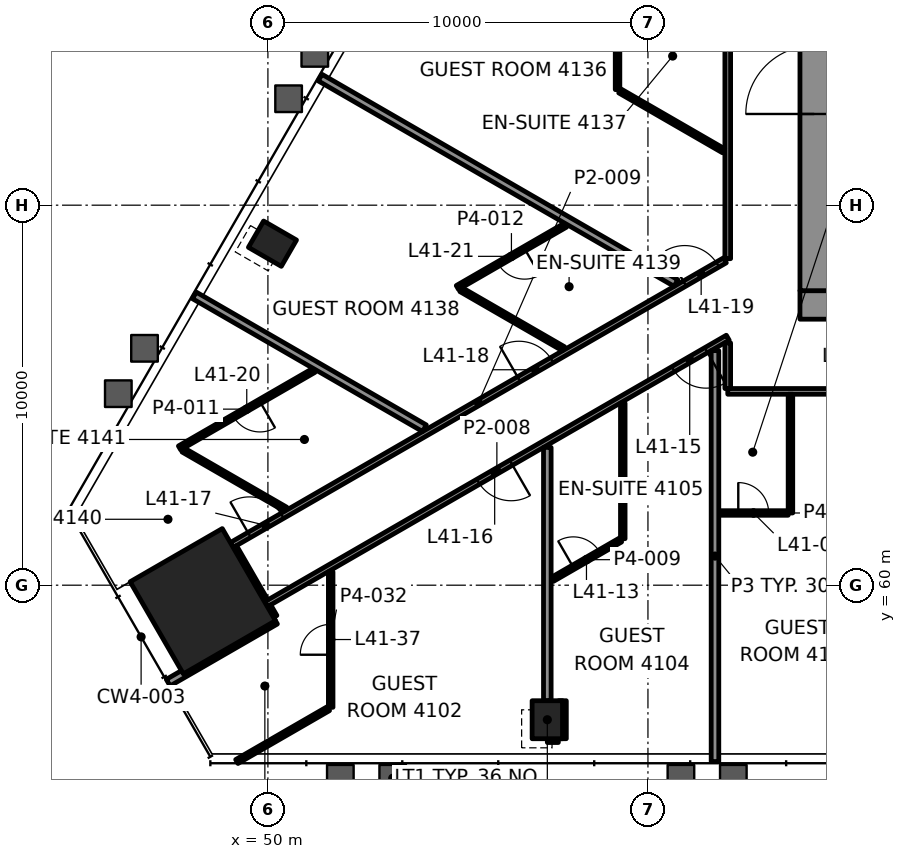
"""IFC4 building model, lengths in metres.
Left out: names, types, materials, properties, quantities, classifications, styles, units other than length and angle.
Written with IfcOpenShell. Run it as: python <this file> out.ifc"""

import sys

from ifc_helpers import new_model, si_unit, direction, frame, frame_2d, origin, origin_2d, place, context, subcontext, project, spatial, rectangle, hollow_rectangle, extrude, element, fill, save


model = new_model("IFC4")
c1 = context("Model", 3, precision=1e-05, world=origin(), true_north=direction((0.0, 1.0)))
c2 = subcontext(c1, "Body", "Model", "MODEL_VIEW")
j1 = project(units=[si_unit("LENGTHUNIT", "METRE"), si_unit("PLANEANGLEUNIT", "RADIAN")], contexts=[c1])
p1 = place(None, origin())
s1 = spatial("IfcSite", under=j1, at=p1, CompositionType="ELEMENT")
p2 = place(p1, origin())
s2 = spatial("IfcBuilding", under=s1, at=p2, CompositionType="ELEMENT")
p3 = place(p2, frame((0.0, 0.0, 179.2)))
s3 = spatial("IfcBuildingStorey", under=s2, at=p3, CompositionType="ELEMENT", Elevation=179.2)
p4 = place(p3, frame((48.287, 59.577, 0.0), z_axis=(0.0, 0.0, 1.0), x_axis=(0.5, -0.866025403784, 0.0)))
e1 = element("IfcColumn", 1, at=p4, inside=s3, PredefinedType="COLUMN", context=c2, shape_type="SweptSolid", body=[
    extrude(rectangle(XDim=2.8, YDim=2.8, at=origin_2d()), origin(), (0.0, 0.0, 1.0), 3.9),
])
for number, where, z_axis, x_axis in (
    (2, (57.352, 56.46, -0.0), (0.0, 0.0, 1.0), (1.0, 0.0, 0.0)),
    (3, (50.12, 68.987, -0.0), (0.0, 0.0, 1.0), (-0.5, -0.866, 0.0)),
):
    element("IfcColumn", number, at=place(p3, frame(where, z_axis=z_axis, x_axis=x_axis)), inside=s3, PredefinedType="COLUMN", context=c2, shape_type="SweptSolid", body=[
        extrude(hollow_rectangle(XDim=0.8, YDim=1.0, WallThickness=0.05, at=origin_2d()), origin(), (0.0, 0.0, 1.0), 3.9),
    ])
p5 = place(p3, frame((64.0, 67.375, 0.0), z_axis=(0.0, 0.0, 1.0), x_axis=(1.0, 0.0, 0.0)))
e4 = element("IfcWall", 4, at=p5, inside=s3, PredefinedType="SHEAR", context=c2, shape_type="SweptSolid", body=[
    extrude(rectangle(XDim=22.0, YDim=0.75, at=frame_2d((11.0, 0.0))), origin(), (0.0, 0.0, 1.0), 3.7),
])
p6 = place(p5, frame((3.15, 0.0, 0.0)))
e5 = element("IfcOpeningElement", 5, at=p6, cuts=e4, PredefinedType="OPENING", context=c2, shape_type="SweptSolid", body=[
    extrude(rectangle(XDim=0.9, YDim=2.1, at=frame_2d((0.45, 1.05))), frame((0.0, 0.385, 0.0), z_axis=(0.0, -1.0, 0.0), x_axis=(1.0, 0.0, 0.0)), (0.0, 0.0, 1.0), 0.77),
])
p7 = place(p3, frame((64.375, 67.75, 0.0), z_axis=(0.0, 0.0, 1.0), x_axis=(0.0, 1.0, 0.0)))
e6 = element("IfcWall", 6, at=p7, inside=s3, PredefinedType="SHEAR", context=c2, shape_type="SweptSolid", body=[
    extrude(rectangle(XDim=14.5, YDim=0.75, at=frame_2d((7.25, 0.0))), origin(), (0.0, 0.0, 1.0), 3.7),
])
p8 = place(p7, frame((4.65, 0.0, 0.0)))
e7 = element("IfcOpeningElement", 7, at=p8, cuts=e6, PredefinedType="OPENING", context=c2, shape_type="SweptSolid", body=[
    extrude(rectangle(XDim=1.8, YDim=2.1, at=frame_2d((0.9, 1.05))), frame((0.0, 0.385, 0.0), z_axis=(0.0, -1.0, 0.0), x_axis=(1.0, 0.0, 0.0)), (0.0, 0.0, 1.0), 0.77),
])
p9 = place(p7, frame((8.5, 0.0, 0.0)))
e8 = element("IfcOpeningElement", 8, at=p9, cuts=e6, PredefinedType="OPENING", context=c2, shape_type="SweptSolid", body=[
    extrude(rectangle(XDim=0.9, YDim=2.1, at=frame_2d((0.45, 1.05))), frame((0.0, 0.385, 0.0), z_axis=(0.0, -1.0, 0.0), x_axis=(1.0, 0.0, 0.0)), (0.0, 0.0, 1.0), 0.77),
])
p10 = place(p7, frame((12.2, 0.0, 0.0)))
e9 = element("IfcOpeningElement", 9, at=p10, cuts=e6, PredefinedType="OPENING", context=c2, shape_type="SweptSolid", body=[
    extrude(rectangle(XDim=0.9, YDim=2.1, at=frame_2d((0.45, 1.05))), frame((0.0, 0.385, 0.0), z_axis=(0.0, -1.0, 0.0), x_axis=(1.0, 0.0, 0.0)), (0.0, 0.0, 1.0), 0.77),
])
p11 = place(p3, frame((57.352, 55.96, 0.0), z_axis=(0.0, 0.0, 1.0), x_axis=(1.0, 0.0, 0.0)))
e10 = element("IfcWall", 10, at=p11, inside=s3, PredefinedType="PARTITIONING", context=c2, shape_type="SweptSolid", body=[
    extrude(rectangle(XDim=0.29, YDim=0.2, at=frame_2d((0.145, 0.0))), origin(), (0.0, 0.0, 1.0), 3.1),
])
p12 = place(p3, frame((61.864, 61.9, 0.0), z_axis=(0.0, 0.0, 1.0), x_axis=(1.0, 0.0, 0.0)))
e11 = element("IfcWall", 11, at=p12, inside=s3, PredefinedType="PARTITIONING", context=c2, shape_type="SweptSolid", body=[
    extrude(rectangle(XDim=1.825, YDim=0.12, at=frame_2d((0.913, 0.0))), origin(), (0.0, 0.0, 1.0), 3.1),
])
p13 = place(p12, frame((0.513, 0.0, 0.0)))
e12 = element("IfcOpeningElement", 12, at=p13, cuts=e11, PredefinedType="OPENING", context=c2, shape_type="SweptSolid", body=[
    extrude(rectangle(XDim=0.8, YDim=2.1, at=frame_2d((0.4, 1.05))), frame((0.0, 0.07, 0.0), z_axis=(0.0, -1.0, 0.0), x_axis=(1.0, 0.0, 0.0)), (0.0, 0.0, 1.0), 0.14),
])
p14 = place(p3, frame((87.9, 65.1, 0.0), z_axis=(0.0, 0.0, 1.0), x_axis=(-1.0, 0.0, 0.0)))
e13 = element("IfcWall", 13, at=p14, inside=s3, PredefinedType="PARTITIONING", context=c2, shape_type="SweptSolid", body=[
    extrude(rectangle(XDim=25.8, YDim=0.15, at=frame_2d((12.9, 0.0))), origin(), (0.0, 0.0, 1.0), 3.1),
])
p15 = place(p14, frame((2.264, 0.0, 0.0)))
e14 = element("IfcOpeningElement", 14, at=p15, cuts=e13, PredefinedType="OPENING", context=c2, shape_type="SweptSolid", body=[
    extrude(rectangle(XDim=1.0, YDim=2.1, at=frame_2d((0.5, 1.05))), frame((0.0, 0.085, 0.0), z_axis=(0.0, -1.0, 0.0), x_axis=(1.0, 0.0, 0.0)), (0.0, 0.0, 1.0), 0.17),
])
p16 = place(p14, frame((10.244, 0.0, 0.0)))
e15 = element("IfcOpeningElement", 15, at=p16, cuts=e13, PredefinedType="OPENING", context=c2, shape_type="SweptSolid", body=[
    extrude(rectangle(XDim=0.9, YDim=2.1, at=frame_2d((0.45, 1.05))), frame((0.0, 0.085, 0.0), z_axis=(0.0, -1.0, 0.0), x_axis=(1.0, 0.0, 0.0)), (0.0, 0.0, 1.0), 0.17),
])
p17 = place(p14, frame((18.135, 0.0, 0.0)))
e16 = element("IfcOpeningElement", 16, at=p17, cuts=e13, PredefinedType="OPENING", context=c2, shape_type="SweptSolid", body=[
    extrude(rectangle(XDim=1.0, YDim=2.1, at=frame_2d((0.5, 1.05))), frame((0.0, 0.085, 0.0), z_axis=(0.0, -1.0, 0.0), x_axis=(1.0, 0.0, 0.0)), (0.0, 0.0, 1.0), 0.17),
])
p18 = place(p14, frame((21.936, 0.0, 0.0)))
e17 = element("IfcOpeningElement", 17, at=p18, cuts=e13, PredefinedType="OPENING", context=c2, shape_type="SweptSolid", body=[
    extrude(rectangle(XDim=1.0, YDim=2.1, at=frame_2d((0.5, 1.05))), frame((0.0, 0.085, 0.0), z_axis=(0.0, -1.0, 0.0), x_axis=(1.0, 0.0, 0.0)), (0.0, 0.0, 1.0), 0.17),
])
p19 = place(p3, frame((49.182, 55.36, 0.0), z_axis=(0.0, 0.0, 1.0), x_axis=(0.86601027972, 0.500026194733, 0.0)))
e18 = element("IfcWall", 18, at=p19, inside=s3, PredefinedType="PARTITIONING", context=c2, shape_type="SweptSolid", body=[
    extrude(rectangle(XDim=2.783, YDim=0.12, at=frame_2d((1.392, 0.0))), origin(), (0.0, 0.0, 1.0), 3.1),
])
p20 = place(p3, frame((57.487, 60.155, 0.0), z_axis=(0.0, 0.0, 1.0), x_axis=(0.866018462269, 0.500012022864, 0.0)))
e19 = element("IfcWall", 19, at=p20, inside=s3, PredefinedType="PARTITIONING", context=c2, shape_type="SweptSolid", body=[
    extrude(rectangle(XDim=2.068, YDim=0.12, at=frame_2d((1.034, 0.0))), origin(), (0.0, 0.0, 1.0), 3.1),
])
p21 = place(p20, frame((0.634, 0.0, 0.0)))
e20 = element("IfcOpeningElement", 20, at=p21, cuts=e19, PredefinedType="OPENING", context=c2, shape_type="SweptSolid", body=[
    extrude(rectangle(XDim=0.8, YDim=2.1, at=frame_2d((0.4, 1.05))), frame((0.0, 0.07, 0.0), z_axis=(0.0, -1.0, 0.0), x_axis=(1.0, 0.0, 0.0)), (0.0, 0.0, 1.0), 0.14),
])
p22 = place(p3, frame((47.376, 57.435, 0.0), z_axis=(0.0, 0.0, 1.0), x_axis=(0.866035906198, 0.499981808845, 0.0)))
e21 = element("IfcWall", 21, at=p22, inside=s3, PredefinedType="PARTITIONING", context=c2, shape_type="SweptSolid", body=[
    extrude(rectangle(XDim=3.259, YDim=0.2, at=frame_2d((1.63, 0.0))), origin(), (0.0, 0.0, 1.0), 3.1),
])
p23 = place(p3, frame((62.1, 66.513, 0.0), z_axis=(0.0, 0.0, 1.0), x_axis=(-0.866025334814, -0.500000119461, 0.0)))
e22 = element("IfcWall", 22, at=p23, inside=s3, PredefinedType="PARTITIONING", context=c2, shape_type="SweptSolid", body=[
    extrude(rectangle(XDim=14.03, YDim=0.15, at=frame_2d((7.015, 0.0))), origin(), (0.0, 0.0, 1.0), 2.947),
])
p24 = place(p23, frame((0.656, 0.0, 0.0)))
e23 = element("IfcOpeningElement", 23, at=p24, cuts=e22, PredefinedType="OPENING", context=c2, shape_type="SweptSolid", body=[
    extrude(rectangle(XDim=1.0, YDim=2.1, at=frame_2d((0.5, 1.05))), frame((0.0, 0.085, 0.0), z_axis=(0.0, -1.0, 0.0), x_axis=(1.0, 0.0, 0.0)), (0.0, 0.0, 1.0), 0.17),
])
p25 = place(p23, frame((6.582, 0.0, 0.0)))
e24 = element("IfcOpeningElement", 24, at=p25, cuts=e22, PredefinedType="OPENING", context=c2, shape_type="SweptSolid", body=[
    extrude(rectangle(XDim=1.0, YDim=2.1, at=frame_2d((0.5, 1.05))), frame((0.0, 0.085, 0.0), z_axis=(0.0, -1.0, 0.0), x_axis=(1.0, 0.0, 0.0)), (0.0, 0.0, 1.0), 0.17),
])
p26 = place(p3, frame((49.05, 61.057, 0.0), z_axis=(0.0, 0.0, 1.0), x_axis=(0.866027379905, 0.499996577244, 0.0)))
e25 = element("IfcWall", 25, at=p26, inside=s3, PredefinedType="PARTITIONING", context=c2, shape_type="SweptSolid", body=[
    extrude(rectangle(XDim=14.982, YDim=0.15, at=frame_2d((7.491, 0.0))), origin(), (0.0, 0.0, 1.0), 3.1),
])
p27 = place(p26, frame((0.532, 0.0, 0.0)))
e26 = element("IfcOpeningElement", 26, at=p27, cuts=e25, PredefinedType="OPENING", context=c2, shape_type="SweptSolid", body=[
    extrude(rectangle(XDim=1.0, YDim=2.1, at=frame_2d((0.5, 1.05))), frame((0.0, 0.085, 0.0), z_axis=(0.0, -1.0, 0.0), x_axis=(1.0, 0.0, 0.0)), (0.0, 0.0, 1.0), 0.17),
])
p28 = place(p26, frame((8.725, 0.0, 0.0)))
e27 = element("IfcOpeningElement", 27, at=p28, cuts=e25, PredefinedType="OPENING", context=c2, shape_type="SweptSolid", body=[
    extrude(rectangle(XDim=1.0, YDim=2.1, at=frame_2d((0.5, 1.05))), frame((0.0, 0.085, 0.0), z_axis=(0.0, -1.0, 0.0), x_axis=(1.0, 0.0, 0.0)), (0.0, 0.0, 1.0), 0.17),
])
p29 = place(p26, frame((13.76, 0.0, 0.0)))
e28 = element("IfcOpeningElement", 28, at=p29, cuts=e25, PredefinedType="OPENING", context=c2, shape_type="SweptSolid", body=[
    extrude(rectangle(XDim=1.0, YDim=2.1, at=frame_2d((0.5, 1.05))), frame((0.0, 0.085, 0.0), z_axis=(0.0, -1.0, 0.0), x_axis=(1.0, 0.0, 0.0)), (0.0, 0.0, 1.0), 0.17),
])
p30 = place(p3, frame((51.212, 65.654, 0.0), z_axis=(0.0, 0.0, 1.0), x_axis=(-0.866038243659, -0.499977760025, 0.0)))
e29 = element("IfcWall", 29, at=p30, inside=s3, PredefinedType="PARTITIONING", context=c2, shape_type="SweptSolid", body=[
    extrude(rectangle(XDim=4.084, YDim=0.12, at=frame_2d((2.042, 0.0))), origin(), (0.0, 0.0, 1.0), 3.1),
])
p31 = place(p30, frame((1.642, 0.0, 0.0)))
e30 = element("IfcOpeningElement", 30, at=p31, cuts=e29, PredefinedType="OPENING", context=c2, shape_type="SweptSolid", body=[
    extrude(rectangle(XDim=0.8, YDim=2.1, at=frame_2d((0.4, 1.05))), frame((0.0, 0.07, 0.0), z_axis=(0.0, -1.0, 0.0), x_axis=(1.0, 0.0, 0.0)), (0.0, 0.0, 1.0), 0.14),
])
p32 = place(p3, frame((57.83, 69.475, 0.0), z_axis=(0.0, 0.0, 1.0), x_axis=(-0.866038236991, -0.499977771575, 0.0)))
e31 = element("IfcWall", 31, at=p32, inside=s3, PredefinedType="PARTITIONING", context=c2, shape_type="SweptSolid", body=[
    extrude(rectangle(XDim=3.283, YDim=0.12, at=frame_2d((1.642, 0.0))), origin(), (0.0, 0.0, 1.0), 3.1),
])
p33 = place(p32, frame((1.242, 0.0, 0.0)))
e32 = element("IfcOpeningElement", 32, at=p33, cuts=e31, PredefinedType="OPENING", context=c2, shape_type="SweptSolid", body=[
    extrude(rectangle(XDim=0.8, YDim=2.1, at=frame_2d((0.4, 1.05))), frame((0.0, 0.07, 0.0), z_axis=(0.0, -1.0, 0.0), x_axis=(1.0, 0.0, 0.0)), (0.0, 0.0, 1.0), 0.14),
])
p34 = place(p3, frame((63.75, 61.9, 0.0), z_axis=(0.0, 0.0, 1.0), x_axis=(0.0, 1.0, 0.0)))
e33 = element("IfcWall", 33, at=p34, inside=s3, PredefinedType="PARTITIONING", context=c2, shape_type="SweptSolid", body=[
    extrude(rectangle(XDim=3.125, YDim=0.12, at=frame_2d((1.562, 0.0))), origin(), (0.0, 0.0, 1.0), 3.1),
])
p35 = place(p3, frame((62.1, 65.175, 0.0), z_axis=(0.0, 0.0, 1.0), x_axis=(0.0, 1.0, 0.0)))
e34 = element("IfcWall", 34, at=p35, inside=s3, PredefinedType="PARTITIONING", context=c2, shape_type="SweptSolid", body=[
    extrude(rectangle(XDim=1.201, YDim=0.15, at=frame_2d((0.601, 0.0))), origin(), (0.0, 0.0, 1.0), 2.947),
])
p36 = place(p3, frame((62.1, 68.591, 0.0), z_axis=(0.0, 0.0, 1.0), x_axis=(0.0, 1.0, 0.0)))
e35 = element("IfcWall", 35, at=p36, inside=s3, PredefinedType="PARTITIONING", context=c2, shape_type="SweptSolid", body=[
    extrude(rectangle(XDim=16.308, YDim=0.15, at=frame_2d((8.154, 0.0))), origin(), (0.0, 0.0, 1.0), 3.1),
])
p37 = place(p3, frame((61.764, 55.36, 0.0), z_axis=(0.0, 0.0, 1.0), x_axis=(0.0, 1.0, 0.0)))
e36 = element("IfcWall", 36, at=p37, inside=s3, PredefinedType="PARTITIONING", context=c2, shape_type="SweptSolid", body=[
    extrude(rectangle(XDim=10.813, YDim=0.2, at=frame_2d((5.406, 0.0))), origin(), (0.0, 0.0, 1.0), 2.947),
])
p38 = place(p3, frame((59.338, 61.223, 0.0), z_axis=(0.0, 0.0, 1.0), x_axis=(0.0, 1.0, 0.0)))
e37 = element("IfcWall", 37, at=p38, inside=s3, PredefinedType="PARTITIONING", context=c2, shape_type="SweptSolid", body=[
    extrude(rectangle(XDim=3.568, YDim=0.12, at=frame_2d((1.784, 0.0))), origin(), (0.0, 0.0, 1.0), 2.947),
])
p39 = place(p3, frame((59.2, 76.371, 0.0), z_axis=(0.0, 0.0, 1.0), x_axis=(0.0, -1.0, 0.0)))
e38 = element("IfcWall", 38, at=p39, inside=s3, PredefinedType="PARTITIONING", context=c2, shape_type="SweptSolid", body=[
    extrude(rectangle(XDim=3.329, YDim=0.12, at=frame_2d((1.665, 0.0))), origin(), (0.0, 0.0, 1.0), 3.1),
])
p40 = place(p39, frame((1.265, 0.0, 0.0)))
e39 = element("IfcOpeningElement", 39, at=p40, cuts=e38, PredefinedType="OPENING", context=c2, shape_type="SweptSolid", body=[
    extrude(rectangle(XDim=0.8, YDim=2.1, at=frame_2d((0.4, 1.05))), frame((0.0, 0.07, 0.0), z_axis=(0.0, -1.0, 0.0), x_axis=(1.0, 0.0, 0.0)), (0.0, 0.0, 1.0), 0.14),
])
p41 = place(p3, frame((57.752, 55.96, 0.0), z_axis=(0.0, 0.0, 1.0), x_axis=(0.0, 1.0, 0.0)))
e40 = element("IfcWall", 40, at=p41, inside=s3, PredefinedType="PARTITIONING", context=c2, shape_type="SweptSolid", body=[
    extrude(rectangle(XDim=1.0, YDim=0.2, at=frame_2d((0.5, 0.0))), origin(), (0.0, 0.0, 1.0), 3.022),
])
p42 = place(p3, frame((57.352, 56.96, 0.0), z_axis=(0.0, 0.0, 1.0), x_axis=(0.0, 1.0, 0.0)))
e41 = element("IfcWall", 41, at=p42, inside=s3, PredefinedType="PARTITIONING", context=c2, shape_type="SweptSolid", body=[
    extrude(rectangle(XDim=6.666, YDim=0.2, at=frame_2d((3.333, 0.0))), origin(), (0.0, 0.0, 1.0), 3.1),
])
p43 = place(p3, frame((51.652, 56.786, 0.0), z_axis=(0.0, 0.0, 1.0), x_axis=(0.0, 1.0, 0.0)))
e42 = element("IfcWall", 42, at=p43, inside=s3, PredefinedType="PARTITIONING", context=c2, shape_type="SweptSolid", body=[
    extrude(rectangle(XDim=3.568, YDim=0.12, at=frame_2d((1.784, 0.0))), origin(), (0.0, 0.0, 1.0), 3.1),
])
p44 = place(p43, frame((1.384, 0.0, 0.0)))
e43 = element("IfcOpeningElement", 43, at=p44, cuts=e42, PredefinedType="OPENING", context=c2, shape_type="SweptSolid", body=[
    extrude(rectangle(XDim=0.8, YDim=2.1, at=frame_2d((0.4, 1.05))), frame((0.0, 0.07, 0.0), z_axis=(0.0, -1.0, 0.0), x_axis=(1.0, 0.0, 0.0)), (0.0, 0.0, 1.0), 0.14),
])
p45 = place(p3, frame((50.15, 59.152, 0.0), z_axis=(0.0, 0.0, 1.0), x_axis=(-0.499939380126, 0.866060399857, 0.0)))
e44 = element("IfcWall", 44, at=p45, inside=s3, PredefinedType="PARTITIONING", context=c2, shape_type="SweptSolid", body=[
    extrude(rectangle(XDim=0.325, YDim=0.2, at=frame_2d((0.162, 0.0))), origin(), (0.0, 0.0, 1.0), 3.1),
])
p46 = place(p3, frame((61.99, 71.431, 0.0), z_axis=(0.0, 0.0, 1.0), x_axis=(-0.866028267601, 0.499995039691, 0.0)))
e45 = element("IfcWall", 45, at=p46, inside=s3, PredefinedType="PARTITIONING", context=c2, shape_type="SweptSolid", body=[
    extrude(rectangle(XDim=3.153, YDim=0.12, at=frame_2d((1.576, 0.0))), origin(), (0.0, 0.0, 1.0), 3.1),
])
p47 = place(p3, frame((60.737, 67.951, 0.0), z_axis=(0.0, 0.0, 1.0), x_axis=(-0.866033683985, 0.499985657998, 0.0)))
e46 = element("IfcWall", 46, at=p47, inside=s3, PredefinedType="PARTITIONING", context=c2, shape_type="SweptSolid", body=[
    extrude(rectangle(XDim=10.813, YDim=0.2, at=frame_2d((5.406, 0.0))), origin(), (0.0, 0.0, 1.0), 3.022),
])
p48 = place(p3, frame((57.776, 66.222, 0.0), z_axis=(0.0, 0.0, 1.0), x_axis=(-0.866009247561, 0.500027982357, 0.0)))
e47 = element("IfcWall", 47, at=p48, inside=s3, PredefinedType="PARTITIONING", context=c2, shape_type="SweptSolid", body=[
    extrude(rectangle(XDim=3.113, YDim=0.12, at=frame_2d((1.556, 0.0))), origin(), (0.0, 0.0, 1.0), 3.1),
])
p49 = place(p3, frame((54.119, 64.13, 0.0), z_axis=(0.0, 0.0, 1.0), x_axis=(-0.866016957496, 0.500014629116, 0.0)))
e48 = element("IfcWall", 48, at=p49, inside=s3, PredefinedType="PARTITIONING", context=c2, shape_type="SweptSolid", body=[
    extrude(rectangle(XDim=6.992, YDim=0.2, at=frame_2d((3.496, 0.0))), origin(), (0.0, 0.0, 1.0), 3.1),
])
p50 = place(p3, frame((50.466, 62.001, 0.0), z_axis=(0.0, 0.0, 1.0), x_axis=(-0.866028856698, 0.499994019331, 0.0)))
e49 = element("IfcWall", 49, at=p50, inside=s3, PredefinedType="PARTITIONING", context=c2, shape_type="SweptSolid", body=[
    extrude(rectangle(XDim=3.113, YDim=0.12, at=frame_2d((1.556, 0.0))), origin(), (0.0, 0.0, 1.0), 3.1),
])
p51 = place(p3, frame((49.912, 59.563, 0.0), z_axis=(0.0, 0.0, 1.0), x_axis=(-0.500055614084, 0.865993292597, 0.0)))
e50 = element("IfcWall", 50, at=p51, inside=s3, PredefinedType="PARTITIONING", context=c2, shape_type="SweptSolid", body=[
    extrude(rectangle(XDim=1.649, YDim=0.2, at=frame_2d((0.825, 0.0))), origin(), (0.0, 0.0, 1.0), 2.947),
])
p52 = place(p13, origin())
e51 = element("IfcDoor", 51, at=p52, inside=s3, OperationType="SINGLE_SWING_RIGHT", PredefinedType="DOOR", context=c2, shape_type="SweptSolid", body=[
    extrude(rectangle(XDim=0.8, YDim=2.1, at=frame_2d((0.4, 1.05))), frame((0.0, 0.025, 0.0), z_axis=(0.0, -1.0, 0.0), x_axis=(1.0, 0.0, 0.0)), (0.0, 0.0, 1.0), 0.05),
])
fill(e12, e51)
p53 = place(p21, origin())
e52 = element("IfcDoor", 52, at=p53, inside=s3, OperationType="SINGLE_SWING_RIGHT", PredefinedType="DOOR", context=c2, shape_type="SweptSolid", body=[
    extrude(rectangle(XDim=0.8, YDim=2.1, at=frame_2d((0.4, 1.05))), frame((0.0, 0.025, 0.0), z_axis=(0.0, -1.0, 0.0), x_axis=(1.0, 0.0, 0.0)), (0.0, 0.0, 1.0), 0.05),
])
fill(e20, e52)
p54 = place(p24, origin())
e53 = element("IfcDoor", 53, at=p54, inside=s3, OperationType="SINGLE_SWING_RIGHT", PredefinedType="DOOR", context=c2, shape_type="SweptSolid", body=[
    extrude(rectangle(XDim=1.0, YDim=2.1, at=frame_2d((0.5, 1.05))), frame((0.0, 0.025, 0.0), z_axis=(0.0, -1.0, 0.0), x_axis=(1.0, 0.0, 0.0)), (0.0, 0.0, 1.0), 0.05),
])
fill(e23, e53)
p55 = place(p25, origin())
e54 = element("IfcDoor", 54, at=p55, inside=s3, OperationType="SINGLE_SWING_RIGHT", PredefinedType="DOOR", context=c2, shape_type="SweptSolid", body=[
    extrude(rectangle(XDim=1.0, YDim=2.1, at=frame_2d((0.5, 1.05))), frame((0.0, 0.025, 0.0), z_axis=(0.0, -1.0, 0.0), x_axis=(1.0, 0.0, 0.0)), (0.0, 0.0, 1.0), 0.05),
])
fill(e24, e54)
p56 = place(p27, origin())
e55 = element("IfcDoor", 55, at=p56, inside=s3, OperationType="SINGLE_SWING_LEFT", PredefinedType="DOOR", context=c2, shape_type="SweptSolid", body=[
    extrude(rectangle(XDim=1.0, YDim=2.1, at=frame_2d((0.5, 1.05))), frame((0.0, 0.025, 0.0), z_axis=(0.0, -1.0, 0.0), x_axis=(1.0, 0.0, 0.0)), (0.0, 0.0, 1.0), 0.05),
])
fill(e26, e55)
p57 = place(p28, origin())
e56 = element("IfcDoor", 56, at=p57, inside=s3, OperationType="SINGLE_SWING_LEFT", PredefinedType="DOOR", context=c2, shape_type="SweptSolid", body=[
    extrude(rectangle(XDim=1.0, YDim=2.1, at=frame_2d((0.5, 1.05))), frame((0.0, 0.025, 0.0), z_axis=(0.0, -1.0, 0.0), x_axis=(1.0, 0.0, 0.0)), (0.0, 0.0, 1.0), 0.05),
])
fill(e27, e56)
p58 = place(p29, origin())
e57 = element("IfcDoor", 57, at=p58, inside=s3, OperationType="SINGLE_SWING_LEFT", PredefinedType="DOOR", context=c2, shape_type="SweptSolid", body=[
    extrude(rectangle(XDim=1.0, YDim=2.1, at=frame_2d((0.5, 1.05))), frame((0.0, 0.025, 0.0), z_axis=(0.0, -1.0, 0.0), x_axis=(1.0, 0.0, 0.0)), (0.0, 0.0, 1.0), 0.05),
])
fill(e28, e57)
p59 = place(p31, origin())
e58 = element("IfcDoor", 58, at=p59, inside=s3, OperationType="SINGLE_SWING_LEFT", PredefinedType="DOOR", context=c2, shape_type="SweptSolid", body=[
    extrude(rectangle(XDim=0.8, YDim=2.1, at=frame_2d((0.4, 1.05))), frame((0.0, 0.025, 0.0), z_axis=(0.0, -1.0, 0.0), x_axis=(1.0, 0.0, 0.0)), (0.0, 0.0, 1.0), 0.05),
])
fill(e30, e58)
p60 = place(p33, origin())
e59 = element("IfcDoor", 59, at=p60, inside=s3, OperationType="SINGLE_SWING_LEFT", PredefinedType="DOOR", context=c2, shape_type="SweptSolid", body=[
    extrude(rectangle(XDim=0.8, YDim=2.1, at=frame_2d((0.4, 1.05))), frame((0.0, 0.025, 0.0), z_axis=(0.0, -1.0, 0.0), x_axis=(1.0, 0.0, 0.0)), (0.0, 0.0, 1.0), 0.05),
])
fill(e32, e59)
p61 = place(p44, origin())
e60 = element("IfcDoor", 60, at=p61, inside=s3, OperationType="SINGLE_SWING_RIGHT", PredefinedType="DOOR", context=c2, shape_type="SweptSolid", body=[
    extrude(rectangle(XDim=0.8, YDim=2.1, at=frame_2d((0.4, 1.05))), frame((0.0, 0.025, 0.0), z_axis=(0.0, -1.0, 0.0), x_axis=(1.0, 0.0, 0.0)), (0.0, 0.0, 1.0), 0.05),
])
fill(e43, e60)
p62 = place(p8, origin())
e61 = element("IfcDoor", 61, at=p62, inside=s3, OperationType="SINGLE_SWING_LEFT", PredefinedType="DOOR", context=c2, shape_type="SweptSolid", body=[
    extrude(rectangle(XDim=1.8, YDim=2.1, at=frame_2d((0.9, 1.05))), frame((0.0, 0.095, 0.0), z_axis=(0.0, -1.0, 0.0), x_axis=(1.0, 0.0, 0.0)), (0.0, 0.0, 1.0), 0.19),
])
fill(e7, e61)
save(model, sys.argv[1])
